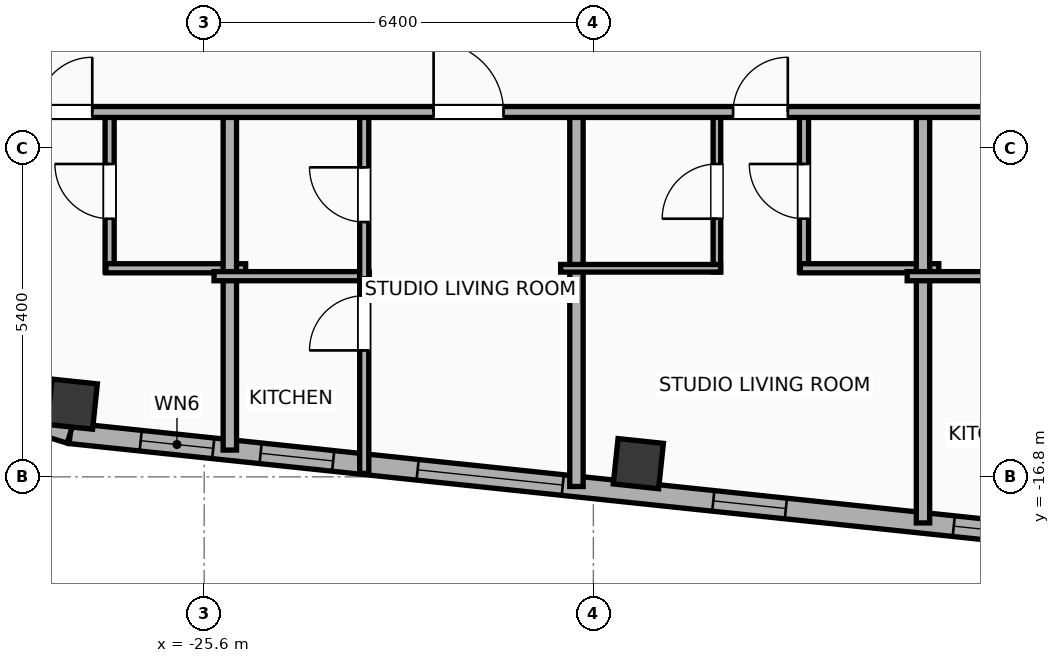
"""IFC4 building model, lengths in metres.
Left out: names, types, materials, properties, quantities, classifications, styles, units other than length and angle.
Written with IfcOpenShell. Run it as: python <this file> out.ifc"""

import sys

from ifc_helpers import new_model, si_unit, direction, frame, frame_2d, origin, origin_2d, place, context, subcontext, project, spatial, rectangle, hollow_rectangle, extrude, element, fill, save


model = new_model("IFC4")
c1 = context("Model", 3, precision=1e-05, world=origin(), true_north=direction((0.0, 1.0)))
c2 = subcontext(c1, "Body", "Model", "MODEL_VIEW")
j1 = project(units=[si_unit("LENGTHUNIT", "METRE"), si_unit("PLANEANGLEUNIT", "RADIAN")], contexts=[c1])
p1 = place(None, origin())
s1 = spatial("IfcSite", under=j1, at=p1, CompositionType="ELEMENT")
p2 = place(p1, origin())
s2 = spatial("IfcBuilding", under=s1, at=p2, CompositionType="ELEMENT")
p3 = place(p2, frame((0.0, 0.0, 283.4)))
s3 = spatial("IfcBuildingStorey", under=s2, at=p3, CompositionType="ELEMENT", Elevation=283.4)
for number, where, z_axis, x_axis in (
    (1, (-27.769, -15.604, 0.0), (0.0, 0.0, 1.0), (0.995, -0.105, 0.0)),
    (2, (-18.46, -16.583, 0.0), (0.0, 0.0, 1.0), (0.995, -0.105, 0.0)),
):
    element("IfcColumn", number, at=place(p3, frame(where, z_axis=z_axis, x_axis=x_axis)), inside=s3, PredefinedType="COLUMN", context=c2, shape_type="SweptSolid", body=[
        extrude(hollow_rectangle(XDim=0.75, YDim=0.75, WallThickness=0.025, at=origin_2d()), origin(), (0.0, 0.0, 1.0), 3.9),
    ])
p4 = place(p3, frame((18.708, -20.972, 0.0), z_axis=(0.0, 0.0, 1.0), x_axis=(-0.994521888554, 0.104528528102, 0.0)))
e3 = element("IfcWall", 3, at=p4, inside=s3, PredefinedType="ELEMENTEDWALL", context=c2, shape_type="SweptSolid", body=[
    extrude(rectangle(XDim=46.766, YDim=0.34, at=frame_2d((23.383, 0.0))), origin(), (0.0, 0.0, 1.0), 3.65),
])
p5 = place(p4, frame((23.833, 0.0, 0.75)))
e4 = element("IfcOpeningElement", 4, at=p5, cuts=e3, PredefinedType="OPENING", context=c2, shape_type="SweptSolid", body=[
    extrude(rectangle(XDim=2.4, YDim=2.1, at=frame_2d((1.2, 1.05))), frame((0.0, 0.18, 0.0), z_axis=(0.0, -1.0, 0.0), x_axis=(1.0, 0.0, 0.0)), (0.0, 0.0, 1.0), 0.36),
])
p6 = place(p4, frame((38.622, 0.0, 0.75)))
e5 = element("IfcOpeningElement", 5, at=p6, cuts=e3, PredefinedType="OPENING", context=c2, shape_type="SweptSolid", body=[
    extrude(rectangle(XDim=2.4, YDim=2.1, at=frame_2d((1.2, 1.05))), frame((0.0, 0.18, 0.0), z_axis=(0.0, -1.0, 0.0), x_axis=(1.0, 0.0, 0.0)), (0.0, 0.0, 1.0), 0.36),
])
p7 = place(p4, frame((44.402, 0.0, 0.75)))
e6 = element("IfcOpeningElement", 6, at=p7, cuts=e3, PredefinedType="OPENING", context=c2, shape_type="SweptSolid", body=[
    extrude(rectangle(XDim=1.2, YDim=2.05, at=frame_2d((0.6, 1.025))), frame((0.0, 0.18, 0.0), z_axis=(0.0, -1.0, 0.0), x_axis=(1.0, 0.0, 0.0)), (0.0, 0.0, 1.0), 0.36),
])
p8 = place(p4, frame((42.419, 0.0, 0.75)))
e7 = element("IfcOpeningElement", 7, at=p8, cuts=e3, PredefinedType="OPENING", context=c2, shape_type="SweptSolid", body=[
    extrude(rectangle(XDim=1.2, YDim=2.05, at=frame_2d((0.6, 1.025))), frame((0.0, 0.18, 0.0), z_axis=(0.0, -1.0, 0.0), x_axis=(1.0, 0.0, 0.0)), (0.0, 0.0, 1.0), 0.36),
])
p9 = place(p4, frame((34.933, 0.0, 0.75)))
e8 = element("IfcOpeningElement", 8, at=p9, cuts=e3, PredefinedType="OPENING", context=c2, shape_type="SweptSolid", body=[
    extrude(rectangle(XDim=1.2, YDim=2.05, at=frame_2d((0.6, 1.025))), frame((0.0, 0.18, 0.0), z_axis=(0.0, -1.0, 0.0), x_axis=(1.0, 0.0, 0.0)), (0.0, 0.0, 1.0), 0.36),
])
p10 = place(p4, frame((28.692, 0.0, 0.75)))
e9 = element("IfcOpeningElement", 9, at=p10, cuts=e3, PredefinedType="OPENING", context=c2, shape_type="SweptSolid", body=[
    extrude(rectangle(XDim=1.2, YDim=2.05, at=frame_2d((0.6, 1.025))), frame((0.0, 0.18, 0.0), z_axis=(0.0, -1.0, 0.0), x_axis=(1.0, 0.0, 0.0)), (0.0, 0.0, 1.0), 0.36),
])
p11 = place(p4, frame((30.957, 0.0, 0.75)))
e10 = element("IfcOpeningElement", 10, at=p11, cuts=e3, PredefinedType="OPENING", context=c2, shape_type="SweptSolid", body=[
    extrude(rectangle(XDim=1.2, YDim=2.05, at=frame_2d((0.6, 1.025))), frame((0.0, 0.18, 0.0), z_axis=(0.0, -1.0, 0.0), x_axis=(1.0, 0.0, 0.0)), (0.0, 0.0, 1.0), 0.36),
])
p12 = place(p4, frame((7.51, 0.0, 0.75)))
e11 = element("IfcOpeningElement", 11, at=p12, cuts=e3, PredefinedType="OPENING", context=c2, shape_type="SweptSolid", body=[
    extrude(rectangle(XDim=1.2, YDim=2.05, at=frame_2d((0.6, 1.025))), frame((0.0, 0.18, 0.0), z_axis=(0.0, -1.0, 0.0), x_axis=(1.0, 0.0, 0.0)), (0.0, 0.0, 1.0), 0.36),
])
p13 = place(p4, frame((4.177, 0.0, 0.75)))
e12 = element("IfcOpeningElement", 12, at=p13, cuts=e3, PredefinedType="OPENING", context=c2, shape_type="SweptSolid", body=[
    extrude(rectangle(XDim=1.2, YDim=2.05, at=frame_2d((0.6, 1.025))), frame((0.0, 0.18, 0.0), z_axis=(0.0, -1.0, 0.0), x_axis=(1.0, 0.0, 0.0)), (0.0, 0.0, 1.0), 0.36),
])
p14 = place(p4, frame((1.378, 0.0, 0.75)))
e13 = element("IfcOpeningElement", 13, at=p14, cuts=e3, PredefinedType="OPENING", context=c2, shape_type="SweptSolid", body=[
    extrude(rectangle(XDim=1.2, YDim=2.05, at=frame_2d((0.6, 1.025))), frame((0.0, 0.18, 0.0), z_axis=(0.0, -1.0, 0.0), x_axis=(1.0, 0.0, 0.0)), (0.0, 0.0, 1.0), 0.36),
])
p15 = place(p4, frame((20.254, 0.0, 0.75)))
e14 = element("IfcOpeningElement", 14, at=p15, cuts=e3, PredefinedType="OPENING", context=c2, shape_type="SweptSolid", body=[
    extrude(rectangle(XDim=1.2, YDim=2.05, at=frame_2d((0.6, 1.025))), frame((0.0, 0.18, 0.0), z_axis=(0.0, -1.0, 0.0), x_axis=(1.0, 0.0, 0.0)), (0.0, 0.0, 1.0), 0.36),
])
p16 = place(p4, frame((16.172, 0.0, 0.75)))
e15 = element("IfcOpeningElement", 15, at=p16, cuts=e3, PredefinedType="OPENING", context=c2, shape_type="SweptSolid", body=[
    extrude(rectangle(XDim=1.2, YDim=2.05, at=frame_2d((0.6, 1.025))), frame((0.0, 0.18, 0.0), z_axis=(0.0, -1.0, 0.0), x_axis=(1.0, 0.0, 0.0)), (0.0, 0.0, 1.0), 0.36),
])
p17 = place(p4, frame((12.11, 0.0, 0.75)))
e16 = element("IfcOpeningElement", 16, at=p17, cuts=e3, PredefinedType="OPENING", context=c2, shape_type="SweptSolid", body=[
    extrude(rectangle(XDim=1.2, YDim=2.05, at=frame_2d((0.6, 1.025))), frame((0.0, 0.18, 0.0), z_axis=(0.0, -1.0, 0.0), x_axis=(1.0, 0.0, 0.0)), (0.0, 0.0, 1.0), 0.36),
])
p18 = place(p3, frame((-27.802, -16.084, 0.0), z_axis=(0.0, 0.0, 1.0), x_axis=(-0.955007802701, 0.296580674994, 0.0)))
e17 = element("IfcWall", 17, at=p18, inside=s3, PredefinedType="ELEMENTEDWALL", context=c2, shape_type="SweptSolid", body=[
    extrude(rectangle(XDim=1.354, YDim=0.34, at=frame_2d((0.677, 0.0))), origin(), (0.0, 0.0, 1.0), 3.65),
])
p19 = place(p3, frame((-30.87, -12.296, 0.0), z_axis=(0.0, 0.0, 1.0), x_axis=(0.104533282919, 0.994521388791, 0.0)))
e18 = element("IfcWall", 18, at=p19, inside=s3, PredefinedType="ELEMENTEDWALL", context=c2, shape_type="SweptSolid", body=[
    extrude(rectangle(XDim=30.366, YDim=0.34, at=frame_2d((15.183, 0.0))), origin(), (0.0, 0.0, 1.0), 3.65),
])
p20 = place(p19, frame((5.842, 0.0, 0.75)))
e19 = element("IfcOpeningElement", 19, at=p20, cuts=e18, PredefinedType="OPENING", context=c2, shape_type="SweptSolid", body=[
    extrude(rectangle(XDim=1.8, YDim=2.1, at=frame_2d((0.9, 1.05))), frame((0.0, 0.18, 0.0), z_axis=(0.0, -1.0, 0.0), x_axis=(1.0, 0.0, 0.0)), (0.0, 0.0, 1.0), 0.36),
])
p21 = place(p19, frame((23.525, 0.0, 0.75)))
e20 = element("IfcOpeningElement", 20, at=p21, cuts=e18, PredefinedType="OPENING", context=c2, shape_type="SweptSolid", body=[
    extrude(rectangle(XDim=1.8, YDim=2.1, at=frame_2d((0.9, 1.05))), frame((0.0, 0.18, 0.0), z_axis=(0.0, -1.0, 0.0), x_axis=(1.0, 0.0, 0.0)), (0.0, 0.0, 1.0), 0.36),
])
p22 = place(p19, frame((27.368, 0.0, 0.75)))
e21 = element("IfcOpeningElement", 21, at=p22, cuts=e18, PredefinedType="OPENING", context=c2, shape_type="SweptSolid", body=[
    extrude(rectangle(XDim=1.2, YDim=2.05, at=frame_2d((0.6, 1.025))), frame((0.0, 0.18, 0.0), z_axis=(0.0, -1.0, 0.0), x_axis=(1.0, 0.0, 0.0)), (0.0, 0.0, 1.0), 0.36),
])
p23 = place(p19, frame((16.487, 0.0, 0.75)))
e22 = element("IfcOpeningElement", 22, at=p23, cuts=e18, PredefinedType="OPENING", context=c2, shape_type="SweptSolid", body=[
    extrude(rectangle(XDim=1.2, YDim=2.05, at=frame_2d((0.6, 1.025))), frame((0.0, 0.18, 0.0), z_axis=(0.0, -1.0, 0.0), x_axis=(1.0, 0.0, 0.0)), (0.0, 0.0, 1.0), 0.36),
])
p24 = place(p3, frame((-27.155, -13.43, 0.0), z_axis=(0.0, 0.0, 1.0), x_axis=(0.0, 1.0, 0.0)))
e23 = element("IfcWall", 23, at=p24, inside=s3, PredefinedType="PLUMBINGWALL", context=c2, shape_type="SweptSolid", body=[
    extrude(rectangle(XDim=2.65, YDim=0.15, at=frame_2d((1.325, 0.0))), origin(), (0.0, 0.0, 1.0), 3.65),
])
p25 = place(p24, frame((0.875, 0.0, 0.0)))
e24 = element("IfcOpeningElement", 24, at=p25, cuts=e23, PredefinedType="OPENING", context=c2, shape_type="SweptSolid", body=[
    extrude(rectangle(XDim=0.9, YDim=2.05, at=frame_2d((0.45, 1.025))), frame((0.0, 0.085, 0.0), z_axis=(0.0, -1.0, 0.0), x_axis=(1.0, 0.0, 0.0)), (0.0, 0.0, 1.0), 0.17),
])
p26 = place(p3, frame((-27.215, -13.37, 0.0), z_axis=(0.0, 0.0, 1.0), x_axis=(1.0, 0.0, 0.0)))
e25 = element("IfcWall", 25, at=p26, inside=s3, PredefinedType="PLUMBINGWALL", context=c2, shape_type="SweptSolid", body=[
    extrude(rectangle(XDim=2.297, YDim=0.15, at=frame_2d((1.148, 0.0))), origin(), (0.0, 0.0, 1.0), 3.65),
])
p27 = place(p3, frame((-25.178, -16.36, 0.0), z_axis=(0.0, 0.0, 1.0), x_axis=(0.0, 1.0, 0.0)))
e26 = element("IfcWall", 26, at=p27, inside=s3, PredefinedType="PARTITIONING", context=c2, shape_type="SweptSolid", body=[
    extrude(rectangle(XDim=5.64, YDim=0.22, at=frame_2d((2.82, 0.0))), origin(), (0.0, 0.0, 1.0), 3.65),
])
p28 = place(p3, frame((-25.438, -13.5, 0.0), z_axis=(0.0, 0.0, 1.0), x_axis=(1.0, 0.0, 0.0)))
e27 = element("IfcWall", 27, at=p28, inside=s3, PredefinedType="PLUMBINGWALL", context=c2, shape_type="SweptSolid", body=[
    extrude(rectangle(XDim=2.55, YDim=0.15, at=frame_2d((1.275, 0.0))), origin(), (0.0, 0.0, 1.0), 3.65),
])
p29 = place(p3, frame((-22.968, -16.743, 0.0), z_axis=(0.0, 0.0, 1.0), x_axis=(0.0, 1.0, 0.0)))
e28 = element("IfcWall", 28, at=p29, inside=s3, PredefinedType="PLUMBINGWALL", context=c2, shape_type="SweptSolid", body=[
    extrude(rectangle(XDim=3.283, YDim=0.15, at=frame_2d((1.641, 0.0))), origin(), (0.0, 0.0, 1.0), 3.65),
])
p30 = place(p29, frame((2.022, 0.0, 0.0)))
e29 = element("IfcOpeningElement", 29, at=p30, cuts=e28, PredefinedType="OPENING", context=c2, shape_type="SweptSolid", body=[
    extrude(rectangle(XDim=0.9, YDim=2.05, at=frame_2d((0.45, 1.025))), frame((0.0, 0.085, 0.0), z_axis=(0.0, -1.0, 0.0), x_axis=(1.0, 0.0, 0.0)), (0.0, 0.0, 1.0), 0.17),
])
p31 = place(p3, frame((-22.968, -13.54, 0.0), z_axis=(0.0, 0.0, 1.0), x_axis=(0.0, 1.0, 0.0)))
e30 = element("IfcWall", 30, at=p31, inside=s3, PredefinedType="PLUMBINGWALL", context=c2, shape_type="SweptSolid", body=[
    extrude(rectangle(XDim=2.76, YDim=0.15, at=frame_2d((1.38, 0.0))), origin(), (0.0, 0.0, 1.0), 3.65),
])
p32 = place(p31, frame((0.93, 0.0, 0.0)))
e31 = element("IfcOpeningElement", 31, at=p32, cuts=e30, PredefinedType="OPENING", context=c2, shape_type="SweptSolid", body=[
    extrude(rectangle(XDim=0.9, YDim=2.05, at=frame_2d((0.45, 1.025))), frame((0.0, 0.085, 0.0), z_axis=(0.0, -1.0, 0.0), x_axis=(1.0, 0.0, 0.0)), (0.0, 0.0, 1.0), 0.17),
])
p33 = place(p3, frame((-19.478, -16.959, 0.0), z_axis=(0.0, 0.0, 1.0), x_axis=(0.0, 1.0, 0.0)))
e32 = element("IfcWall", 32, at=p33, inside=s3, PredefinedType="PARTITIONING", context=c2, shape_type="SweptSolid", body=[
    extrude(rectangle(XDim=6.239, YDim=0.22, at=frame_2d((3.119, 0.0))), origin(), (0.0, 0.0, 1.0), 3.65),
])
p34 = place(p3, frame((-17.168, -13.43, 0.0), z_axis=(0.0, 0.0, 1.0), x_axis=(0.0, 1.0, 0.0)))
e33 = element("IfcWall", 33, at=p34, inside=s3, PredefinedType="PARTITIONING", context=c2, shape_type="SweptSolid", body=[
    extrude(rectangle(XDim=2.65, YDim=0.125, at=frame_2d((1.325, 0.0))), origin(), (0.0, 0.0, 1.0), 3.65),
])
p35 = place(p34, frame((0.875, 0.0, 0.0)))
e34 = element("IfcOpeningElement", 34, at=p35, cuts=e33, PredefinedType="OPENING", context=c2, shape_type="SweptSolid", body=[
    extrude(rectangle(XDim=0.9, YDim=2.05, at=frame_2d((0.45, 1.025))), frame((0.0, 0.073, 0.0), z_axis=(0.0, -1.0, 0.0), x_axis=(1.0, 0.0, 0.0)), (0.0, 0.0, 1.0), 0.145),
])
p36 = place(p3, frame((-15.736, -13.43, 0.0), z_axis=(0.0, 0.0, 1.0), x_axis=(0.0, 1.0, 0.0)))
e35 = element("IfcWall", 35, at=p36, inside=s3, PredefinedType="PLUMBINGWALL", context=c2, shape_type="SweptSolid", body=[
    extrude(rectangle(XDim=2.65, YDim=0.15, at=frame_2d((1.325, 0.0))), origin(), (0.0, 0.0, 1.0), 3.65),
])
p37 = place(p36, frame((0.875, 0.0, 0.0)))
e36 = element("IfcOpeningElement", 36, at=p37, cuts=e35, PredefinedType="OPENING", context=c2, shape_type="SweptSolid", body=[
    extrude(rectangle(XDim=0.9, YDim=2.05, at=frame_2d((0.45, 1.025))), frame((0.0, 0.085, 0.0), z_axis=(0.0, -1.0, 0.0), x_axis=(1.0, 0.0, 0.0)), (0.0, 0.0, 1.0), 0.17),
])
p38 = place(p3, frame((-19.738, -13.37, 0.0), z_axis=(0.0, 0.0, 1.0), x_axis=(1.0, 0.0, 0.0)))
e37 = element("IfcWall", 37, at=p38, inside=s3, PredefinedType="PARTITIONING", context=c2, shape_type="SweptSolid", body=[
    extrude(rectangle(XDim=2.63, YDim=0.125, at=frame_2d((1.315, 0.0))), origin(), (0.0, 0.0, 1.0), 3.65),
])
p39 = place(p3, frame((-15.796, -13.37, 0.0), z_axis=(0.0, 0.0, 1.0), x_axis=(1.0, 0.0, 0.0)))
e38 = element("IfcWall", 38, at=p39, inside=s3, PredefinedType="PLUMBINGWALL", context=c2, shape_type="SweptSolid", body=[
    extrude(rectangle(XDim=2.277, YDim=0.15, at=frame_2d((1.138, 0.0))), origin(), (0.0, 0.0, 1.0), 3.65),
])
p40 = place(p3, frame((-13.779, -17.558, 0.0), z_axis=(0.0, 0.0, 1.0), x_axis=(0.0, 1.0, 0.0)))
e39 = element("IfcWall", 39, at=p40, inside=s3, PredefinedType="PARTITIONING", context=c2, shape_type="SweptSolid", body=[
    extrude(rectangle(XDim=6.838, YDim=0.22, at=frame_2d((3.419, 0.0))), origin(), (0.0, 0.0, 1.0), 3.65),
])
p41 = place(p3, frame((-14.039, -13.5, 0.0), z_axis=(0.0, 0.0, 1.0), x_axis=(1.0, 0.0, 0.0)))
e40 = element("IfcWall", 40, at=p41, inside=s3, PredefinedType="PLUMBINGWALL", context=c2, shape_type="SweptSolid", body=[
    extrude(rectangle(XDim=2.55, YDim=0.15, at=frame_2d((1.275, 0.0))), origin(), (0.0, 0.0, 1.0), 3.65),
])
p42 = place(p3, frame((-30.713, -10.8, 0.0), z_axis=(0.0, 0.0, 1.0), x_axis=(1.0, 0.0, 0.0)))
e41 = element("IfcWall", 41, at=p42, inside=s3, PredefinedType="PARTITIONING", context=c2, shape_type="SweptSolid", body=[
    extrude(rectangle(XDim=22.633, YDim=0.18, at=frame_2d((11.316, 0.0))), origin(), (0.0, 0.0, 1.0), 3.65),
])
p43 = place(p42, frame((2.372, 0.0, 0.0)))
e42 = element("IfcOpeningElement", 42, at=p43, cuts=e41, PredefinedType="OPENING", context=c2, shape_type="SweptSolid", body=[
    extrude(rectangle(XDim=0.9, YDim=2.05, at=frame_2d((0.45, 1.025))), frame((0.0, 0.1, 0.0), z_axis=(0.0, -1.0, 0.0), x_axis=(1.0, 0.0, 0.0)), (0.0, 0.0, 1.0), 0.2),
])
p44 = place(p42, frame((8.885, 0.0, 0.0)))
e43 = element("IfcOpeningElement", 43, at=p44, cuts=e41, PredefinedType="OPENING", context=c2, shape_type="SweptSolid", body=[
    extrude(rectangle(XDim=1.15, YDim=2.05, at=frame_2d((0.575, 1.025))), frame((0.0, 0.1, 0.0), z_axis=(0.0, -1.0, 0.0), x_axis=(1.0, 0.0, 0.0)), (0.0, 0.0, 1.0), 0.2),
])
p45 = place(p42, frame((13.811, 0.0, 0.0)))
e44 = element("IfcOpeningElement", 44, at=p45, cuts=e41, PredefinedType="OPENING", context=c2, shape_type="SweptSolid", body=[
    extrude(rectangle(XDim=0.9, YDim=2.05, at=frame_2d((0.45, 1.025))), frame((0.0, 0.1, 0.0), z_axis=(0.0, -1.0, 0.0), x_axis=(1.0, 0.0, 0.0)), (0.0, 0.0, 1.0), 0.2),
])
p46 = place(p42, frame((20.283, 0.0, 0.0)))
e45 = element("IfcOpeningElement", 45, at=p46, cuts=e41, PredefinedType="OPENING", context=c2, shape_type="SweptSolid", body=[
    extrude(rectangle(XDim=1.15, YDim=2.05, at=frame_2d((0.575, 1.025))), frame((0.0, 0.1, 0.0), z_axis=(0.0, -1.0, 0.0), x_axis=(1.0, 0.0, 0.0)), (0.0, 0.0, 1.0), 0.2),
])
p47 = place(p6, origin())
e46 = element("IfcWindow", 46, at=p47, inside=s3, PartitioningType="SINGLE_PANEL", PredefinedType="WINDOW", context=c2, shape_type="SweptSolid", body=[
    extrude(rectangle(XDim=2.4, YDim=2.1, at=frame_2d((1.2, 1.05))), frame((0.0, 0.03, 0.0), z_axis=(0.0, -1.0, 0.0), x_axis=(1.0, 0.0, 0.0)), (0.0, 0.0, 1.0), 0.06),
])
fill(e5, e46)
p48 = place(p7, origin())
e47 = element("IfcWindow", 47, at=p48, inside=s3, PartitioningType="SINGLE_PANEL", PredefinedType="WINDOW", context=c2, shape_type="SweptSolid", body=[
    extrude(rectangle(XDim=1.2, YDim=2.05, at=frame_2d((0.6, 1.025))), frame((0.0, 0.03, 0.0), z_axis=(0.0, -1.0, 0.0), x_axis=(1.0, 0.0, 0.0)), (0.0, 0.0, 1.0), 0.06),
])
fill(e6, e47)
p49 = place(p8, origin())
e48 = element("IfcWindow", 48, at=p49, inside=s3, PartitioningType="SINGLE_PANEL", PredefinedType="WINDOW", context=c2, shape_type="SweptSolid", body=[
    extrude(rectangle(XDim=1.2, YDim=2.05, at=frame_2d((0.6, 1.025))), frame((0.0, 0.03, 0.0), z_axis=(0.0, -1.0, 0.0), x_axis=(1.0, 0.0, 0.0)), (0.0, 0.0, 1.0), 0.06),
])
fill(e7, e48)
p50 = place(p9, origin())
e49 = element("IfcWindow", 49, at=p50, inside=s3, PartitioningType="SINGLE_PANEL", PredefinedType="WINDOW", context=c2, shape_type="SweptSolid", body=[
    extrude(rectangle(XDim=1.2, YDim=2.05, at=frame_2d((0.6, 1.025))), frame((0.0, 0.03, 0.0), z_axis=(0.0, -1.0, 0.0), x_axis=(1.0, 0.0, 0.0)), (0.0, 0.0, 1.0), 0.06),
])
fill(e8, e49)
p51 = place(p11, origin())
e50 = element("IfcWindow", 50, at=p51, inside=s3, PartitioningType="SINGLE_PANEL", PredefinedType="WINDOW", context=c2, shape_type="SweptSolid", body=[
    extrude(rectangle(XDim=1.2, YDim=2.05, at=frame_2d((0.6, 1.025))), frame((0.0, 0.03, 0.0), z_axis=(0.0, -1.0, 0.0), x_axis=(1.0, 0.0, 0.0)), (0.0, 0.0, 1.0), 0.06),
])
fill(e10, e50)
p52 = place(p25, origin())
e51 = element("IfcDoor", 51, at=p52, inside=s3, OperationType="SINGLE_SWING_RIGHT", PredefinedType="DOOR", context=c2, shape_type="SweptSolid", body=[
    extrude(rectangle(XDim=0.9, YDim=2.05, at=frame_2d((0.45, 1.025))), frame((0.0, 0.025, 0.0), z_axis=(0.0, -1.0, 0.0), x_axis=(1.0, 0.0, 0.0)), (0.0, 0.0, 1.0), 0.05),
])
fill(e24, e51)
p53 = place(p30, origin())
e52 = element("IfcDoor", 52, at=p53, inside=s3, OperationType="SINGLE_SWING_LEFT", PredefinedType="DOOR", context=c2, shape_type="SweptSolid", body=[
    extrude(rectangle(XDim=0.9, YDim=2.05, at=frame_2d((0.45, 1.025))), frame((0.0, 0.025, 0.0), z_axis=(0.0, -1.0, 0.0), x_axis=(1.0, 0.0, 0.0)), (0.0, 0.0, 1.0), 0.05),
])
fill(e29, e52)
p54 = place(p32, origin())
e53 = element("IfcDoor", 53, at=p54, inside=s3, OperationType="SINGLE_SWING_RIGHT", PredefinedType="DOOR", context=c2, shape_type="SweptSolid", body=[
    extrude(rectangle(XDim=0.9, YDim=2.05, at=frame_2d((0.45, 1.025))), frame((0.0, 0.025, 0.0), z_axis=(0.0, -1.0, 0.0), x_axis=(1.0, 0.0, 0.0)), (0.0, 0.0, 1.0), 0.05),
])
fill(e31, e53)
p55 = place(p35, origin())
e54 = element("IfcDoor", 54, at=p55, inside=s3, OperationType="SINGLE_SWING_LEFT", PredefinedType="DOOR", context=c2, shape_type="SweptSolid", body=[
    extrude(rectangle(XDim=0.9, YDim=2.05, at=frame_2d((0.45, 1.025))), frame((0.0, 0.025, 0.0), z_axis=(0.0, -1.0, 0.0), x_axis=(1.0, 0.0, 0.0)), (0.0, 0.0, 1.0), 0.05),
])
fill(e34, e54)
p56 = place(p37, origin())
e55 = element("IfcDoor", 55, at=p56, inside=s3, OperationType="SINGLE_SWING_RIGHT", PredefinedType="DOOR", context=c2, shape_type="SweptSolid", body=[
    extrude(rectangle(XDim=0.9, YDim=2.05, at=frame_2d((0.45, 1.025))), frame((0.0, 0.025, 0.0), z_axis=(0.0, -1.0, 0.0), x_axis=(1.0, 0.0, 0.0)), (0.0, 0.0, 1.0), 0.05),
])
fill(e36, e55)
p57 = place(p43, origin())
e56 = element("IfcDoor", 56, at=p57, inside=s3, OperationType="SINGLE_SWING_RIGHT", PredefinedType="DOOR", context=c2, shape_type="SweptSolid", body=[
    extrude(rectangle(XDim=0.9, YDim=2.05, at=frame_2d((0.45, 1.025))), frame((0.0, 0.025, 0.0), z_axis=(0.0, -1.0, 0.0), x_axis=(1.0, 0.0, 0.0)), (0.0, 0.0, 1.0), 0.05),
])
fill(e42, e56)
p58 = place(p44, origin())
e57 = element("IfcDoor", 57, at=p58, inside=s3, OperationType="SINGLE_SWING_LEFT", PredefinedType="DOOR", context=c2, shape_type="SweptSolid", body=[
    extrude(rectangle(XDim=1.15, YDim=2.05, at=frame_2d((0.575, 1.025))), frame((0.0, 0.025, 0.0), z_axis=(0.0, -1.0, 0.0), x_axis=(1.0, 0.0, 0.0)), (0.0, 0.0, 1.0), 0.05),
])
fill(e43, e57)
p59 = place(p45, origin())
e58 = element("IfcDoor", 58, at=p59, inside=s3, OperationType="SINGLE_SWING_RIGHT", PredefinedType="DOOR", context=c2, shape_type="SweptSolid", body=[
    extrude(rectangle(XDim=0.9, YDim=2.05, at=frame_2d((0.45, 1.025))), frame((0.0, 0.025, 0.0), z_axis=(0.0, -1.0, 0.0), x_axis=(1.0, 0.0, 0.0)), (0.0, 0.0, 1.0), 0.05),
])
fill(e44, e58)
save(model, sys.argv[1])
